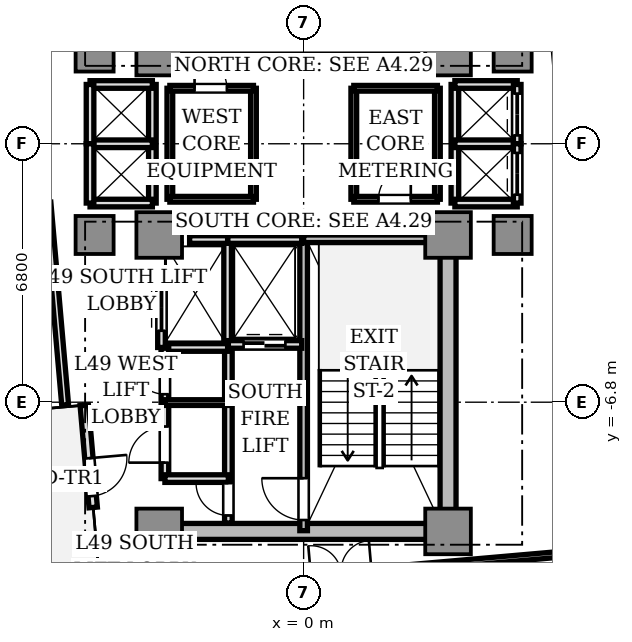
"""IFC4 building model, lengths in metres.
Left out: names, types, materials, properties, quantities, classifications, styles, units other than length and angle.
Written with IfcOpenShell. Run it as: python <this file> out.ifc"""

import sys

from ifc_helpers import new_model, si_unit, direction, frame, frame_2d, origin, origin_2d, place, context, subcontext, project, spatial, rectangle, extrude, source, transform, mapped, element, fill, save


model = new_model("IFC4")
c1 = context("Model", 3, precision=1e-05, world=origin(), true_north=direction((0.0, 1.0)))
c2 = subcontext(c1, "Body", "Model", "MODEL_VIEW")
j1 = project(units=[si_unit("LENGTHUNIT", "METRE"), si_unit("PLANEANGLEUNIT", "RADIAN")], contexts=[c1])
p1 = place(None, origin())
s1 = spatial("IfcSite", under=j1, at=p1, CompositionType="ELEMENT")
p2 = place(p1, origin())
s2 = spatial("IfcBuilding", under=s1, at=p2, CompositionType="ELEMENT")
p3 = place(p2, frame((0.0, 0.0, 178.55)))
s3 = spatial("IfcBuildingStorey", under=s2, at=p3, CompositionType="ELEMENT", Elevation=178.55)
p4 = place(p3, frame((-3.55, -10.2, 0.0), z_axis=(0.0, 0.0, 1.0), x_axis=(1.0, 0.0, 0.0)))
e1 = element("IfcWall", 1, at=p4, inside=s3, PredefinedType="SHEAR", context=c2, shape_type="SweptSolid", body=[
    extrude(rectangle(XDim=7.1, YDim=0.42, at=frame_2d((3.55, 0.0))), origin(), (0.0, 0.0, 1.0), 3.11),
])
p5 = place(p3, frame((3.8, -9.75, 0.0), z_axis=(0.0, 0.0, 1.0), x_axis=(0.0, 1.0, 0.0)))
e2 = element("IfcWall", 2, at=p5, inside=s3, PredefinedType="SHEAR", context=c2, shape_type="SweptSolid", body=[
    extrude(rectangle(XDim=6.9, YDim=0.42, at=frame_2d((3.45, 0.0))), origin(), (0.0, 0.0, 1.0), 3.11),
])
m1 = source(origin(), c2, "Body", "SweptSolid", [
    extrude(rectangle(XDim=1.2, YDim=1.2, at=origin_2d()), origin(), (0.0, 0.0, 1.0), 3.11),
])
for number, where, z_axis, x_axis in (
    (3, (-3.8, 2.4, 0.0), (0.0, 0.0, 1.0), (1.0, 0.0, 0.0)),
    (4, (3.8, 2.4, 0.0), (0.0, 0.0, 1.0), (1.0, 0.0, 0.0)),
    (5, (-3.8, -2.4, 0.0), (0.0, 0.0, 1.0), (1.0, 0.0, 0.0)),
    (6, (3.8, -2.4, 0.0), (0.0, 0.0, 1.0), (1.0, 0.0, 0.0)),
    (7, (-3.8, -10.2, 0.0), (0.0, 0.0, 1.0), (1.0, 0.0, 0.0)),
    (8, (3.8, -10.2, 0.0), (0.0, 0.0, 1.0), (1.0, 0.0, 0.0)),
):
    element("IfcColumn", number, at=place(p3, frame(where, z_axis=z_axis, x_axis=x_axis)), inside=s3, PredefinedType="COLUMN", context=c2, shape_type="MappedRepresentation", body=[
        mapped(m1, transform((0.0, 0.0, 0.0), scale=1.0)),
    ])
m2 = source(origin(), c2, "Body", "SweptSolid", [
    extrude(rectangle(XDim=1.0, YDim=1.0, at=origin_2d()), origin(), (0.0, 0.0, 1.0), 3.11),
])
for number, where, z_axis, x_axis in (
    (9, (5.5, 2.4, 0.0), (0.0, 0.0, 1.0), (1.0, 0.0, 0.0)),
    (10, (-5.5, 2.4, 0.0), (0.0, 0.0, 1.0), (1.0, 0.0, 0.0)),
    (11, (5.5, -2.4, 0.0), (0.0, 0.0, 1.0), (1.0, 0.0, 0.0)),
    (12, (-5.5, -2.4, 0.0), (0.0, 0.0, 1.0), (1.0, 0.0, 0.0)),
):
    element("IfcColumn", number, at=place(p3, frame(where, z_axis=z_axis, x_axis=x_axis)), inside=s3, PredefinedType="COLUMN", context=c2, shape_type="MappedRepresentation", body=[
        mapped(m2, transform((0.0, 0.0, 0.0), scale=1.0)),
    ])
p6 = place(p3, frame((-5.772, -6.879, 0.0), z_axis=(0.0, 0.0, 1.0), x_axis=(0.087168071984, -0.996193619346, 0.0)))
e13 = element("IfcWall", 13, at=p6, inside=s3, PredefinedType="STANDARD", context=c2, shape_type="SweptSolid", body=[
    extrude(rectangle(XDim=2.7, YDim=0.22, at=frame_2d((1.35, 0.0))), origin(), (0.0, 0.0, 1.0), 3.11),
])
p7 = place(p6, frame((1.4, 0.0, 0.0)))
e14 = element("IfcOpeningElement", 14, at=p7, cuts=e13, PredefinedType="OPENING", context=c2, shape_type="SweptSolid", body=[
    extrude(rectangle(XDim=1.0, YDim=2.2, at=frame_2d((0.5, 1.1))), frame((0.0, 0.12, 0.0), z_axis=(0.0, -1.0, 0.0), x_axis=(1.0, 0.0, 0.0)), (0.0, 0.0, 1.0), 0.24),
])
p8 = place(p3, frame((0.0, -10.18, 0.0), z_axis=(0.0, 0.0, 1.0), x_axis=(0.0, 1.0, 0.0)))
e15 = element("IfcWall", 15, at=p8, inside=s3, PredefinedType="SOLIDWALL", context=c2, shape_type="SweptSolid", body=[
    extrude(rectangle(XDim=7.68, YDim=0.2, at=frame_2d((3.84, 0.0))), origin(), (0.0, 0.0, 1.0), 3.11),
])
p9 = place(p8, frame((0.28, 0.0, 0.0)))
e16 = element("IfcOpeningElement", 16, at=p9, cuts=e15, PredefinedType="OPENING", context=c2, shape_type="SweptSolid", body=[
    extrude(rectangle(XDim=1.1, YDim=2.15, at=frame_2d((0.55, 1.075))), frame((0.0, 0.11, 0.0), z_axis=(0.0, -1.0, 0.0), x_axis=(1.0, 0.0, 0.0)), (0.0, 0.0, 1.0), 0.22),
])
p10 = place(p3, frame((0.0, -2.5, 0.0), z_axis=(0.0, 0.0, 1.0), x_axis=(1.0, 0.0, 0.0)))
e17 = element("IfcWall", 17, at=p10, inside=s3, PredefinedType="SOLIDWALL", context=c2, shape_type="SweptSolid", body=[
    extrude(rectangle(XDim=3.72, YDim=0.2, at=frame_2d((1.86, 0.0))), origin(), (0.0, 0.0, 1.0), 3.11),
])
p11 = place(p3, frame((-1.98, -9.98, 0.0), z_axis=(0.0, 0.0, 1.0), x_axis=(0.0, 1.0, 0.0)))
e18 = element("IfcWall", 18, at=p11, inside=s3, PredefinedType="SOLIDWALL", context=c2, shape_type="SweptSolid", body=[
    extrude(rectangle(XDim=4.66, YDim=0.2, at=frame_2d((2.33, 0.0))), origin(), (0.0, 0.0, 1.0), 2.66),
])
p12 = place(p11, frame((0.2, 0.0, 0.0)))
e19 = element("IfcOpeningElement", 19, at=p12, cuts=e18, PredefinedType="OPENING", context=c2, shape_type="SweptSolid", body=[
    extrude(rectangle(XDim=0.85, YDim=2.1, at=frame_2d((0.425, 1.05))), frame((0.0, 0.11, 0.0), z_axis=(0.0, -1.0, 0.0), x_axis=(1.0, 0.0, 0.0)), (0.0, 0.0, 1.0), 0.22),
])
p13 = place(p3, frame((-2.0, -5.28, 0.0), z_axis=(0.0, 0.0, 1.0), x_axis=(0.0, 1.0, 0.0)))
e20 = element("IfcWall", 20, at=p13, inside=s3, PredefinedType="SOLIDWALL", context=c2, shape_type="SweptSolid", body=[
    extrude(rectangle(XDim=2.78, YDim=0.2, at=frame_2d((1.39, 0.0))), origin(), (0.0, 0.0, 1.0), 2.66),
])
p14 = place(p3, frame((-2.0, -2.52, 0.0), z_axis=(0.0, 0.0, 1.0), x_axis=(1.0, 0.0, 0.0)))
e21 = element("IfcWall", 21, at=p14, inside=s3, PredefinedType="SOLIDWALL", context=c2, shape_type="SweptSolid", body=[
    extrude(rectangle(XDim=1.95, YDim=0.2, at=frame_2d((0.975, 0.0))), origin(), (0.0, 0.0, 1.0), 2.66),
])
p15 = place(p3, frame((-1.98, -5.28, 0.0), z_axis=(0.0, 0.0, 1.0), x_axis=(1.0, 0.0, 0.0)))
e22 = element("IfcWall", 22, at=p15, inside=s3, PredefinedType="SOLIDWALL", context=c2, shape_type="SweptSolid", body=[
    extrude(rectangle(XDim=1.93, YDim=0.2, at=frame_2d((0.965, 0.0))), origin(), (0.0, 0.0, 1.0), 2.66),
])
p16 = place(p15, frame((0.4, 0.0, 0.0)))
e23 = element("IfcOpeningElement", 23, at=p16, cuts=e22, PredefinedType="OPENING", context=c2, shape_type="SweptSolid", body=[
    extrude(rectangle(XDim=1.1, YDim=2.2, at=frame_2d((0.55, 1.1))), frame((0.0, 0.11, 0.0), z_axis=(0.0, -1.0, 0.0), x_axis=(1.0, 0.0, 0.0)), (0.0, 0.0, 1.0), 0.22),
])
p17 = place(p3, frame((-3.0, -2.52, 0.0), z_axis=(0.0, 0.0, 1.0), x_axis=(1.0, 0.0, 0.0)))
e24 = element("IfcWall", 24, at=p17, inside=s3, PredefinedType="SOLIDWALL", context=c2, shape_type="SweptSolid", body=[
    extrude(rectangle(XDim=1.0, YDim=0.2, at=frame_2d((0.5, 0.0))), origin(), (0.0, 0.0, 1.0), 2.66),
])
p18 = place(p3, frame((-3.74, -5.36, 0.0), z_axis=(0.0, 0.0, 1.0), x_axis=(1.0, 0.0, 0.0)))
e25 = element("IfcWall", 25, at=p18, inside=s3, PredefinedType="SOLIDWALL", context=c2, shape_type="SweptSolid", body=[
    extrude(rectangle(XDim=1.74, YDim=0.2, at=frame_2d((0.87, 0.0))), origin(), (0.0, 0.0, 1.0), 2.66),
])
p19 = place(p3, frame((-3.74, -5.36, 0.0), z_axis=(0.0, 0.0, 1.0), x_axis=(0.0, 1.0, 0.0)))
e26 = element("IfcWall", 26, at=p19, inside=s3, PredefinedType="SOLIDWALL", context=c2, shape_type="SweptSolid", body=[
    extrude(rectangle(XDim=2.08, YDim=0.2, at=frame_2d((1.04, 0.0))), origin(), (0.0, 0.0, 1.0), 2.66),
])
p20 = place(p19, frame((0.44, 0.0, 0.0)))
e27 = element("IfcOpeningElement", 27, at=p20, cuts=e26, PredefinedType="OPENING", context=c2, shape_type="SweptSolid", body=[
    extrude(rectangle(XDim=1.2, YDim=2.2, at=frame_2d((0.6, 1.1))), frame((0.0, 0.11, 0.0), z_axis=(0.0, -1.0, 0.0), x_axis=(1.0, 0.0, 0.0)), (0.0, 0.0, 1.0), 0.22),
])
p21 = place(p3, frame((3.98, -1.56, 0.0), z_axis=(0.0, 0.0, 1.0), x_axis=(0.0, 1.0, 0.0)))
e28 = element("IfcWall", 28, at=p21, inside=s3, PredefinedType="SOLIDWALL", context=c2, shape_type="SweptSolid", body=[
    extrude(rectangle(XDim=3.12, YDim=0.2, at=frame_2d((1.56, 0.0))), origin(), (0.0, 0.0, 1.0), 2.28),
])
for number, where, z_axis, x_axis in (
    (29, (3.98, 1.56, 0.0), (0.0, 0.0, 1.0), (1.0, 0.0, 0.0)),
    (30, (3.98, -1.56, 0.0), (0.0, 0.0, 1.0), (1.0, 0.0, 0.0)),
    (31, (3.98, 0.0, 0.0), (0.0, 0.0, 1.0), (1.0, 0.0, 0.0)),
):
    element("IfcWall", number, at=place(p3, frame(where, z_axis=z_axis, x_axis=x_axis)), inside=s3, PredefinedType="SOLIDWALL", context=c2, shape_type="SweptSolid", body=[
        extrude(rectangle(XDim=1.64, YDim=0.2, at=frame_2d((0.82, 0.0))), origin(), (0.0, 0.0, 1.0), 2.66),
    ])
p22 = place(p3, frame((5.62, 0.0, 0.0), z_axis=(0.0, 0.0, 1.0), x_axis=(0.0, 1.0, 0.0)))
e32 = element("IfcWall", 32, at=p22, inside=s3, PredefinedType="SOLIDWALL", context=c2, shape_type="SweptSolid", body=[
    extrude(rectangle(XDim=1.56, YDim=0.2, at=frame_2d((0.78, 0.0))), origin(), (0.0, 0.0, 1.0), 2.66),
])
p23 = place(p22, frame((0.22, 0.0, 0.0)))
e33 = element("IfcOpeningElement", 33, at=p23, cuts=e32, PredefinedType="OPENING", context=c2, shape_type="SweptSolid", body=[
    extrude(rectangle(XDim=1.1, YDim=2.2, at=frame_2d((0.55, 1.1))), frame((0.0, 0.11, 0.0), z_axis=(0.0, -1.0, 0.0), x_axis=(1.0, 0.0, 0.0)), (0.0, 0.0, 1.0), 0.22),
])
p24 = place(p3, frame((5.62, -1.56, 0.0), z_axis=(0.0, 0.0, 1.0), x_axis=(0.0, 1.0, 0.0)))
e34 = element("IfcWall", 34, at=p24, inside=s3, PredefinedType="SOLIDWALL", context=c2, shape_type="SweptSolid", body=[
    extrude(rectangle(XDim=1.56, YDim=0.2, at=frame_2d((0.78, 0.0))), origin(), (0.0, 0.0, 1.0), 2.66),
])
p25 = place(p24, frame((0.22, 0.0, 0.0)))
e35 = element("IfcOpeningElement", 35, at=p25, cuts=e34, PredefinedType="OPENING", context=c2, shape_type="SweptSolid", body=[
    extrude(rectangle(XDim=1.1, YDim=2.2, at=frame_2d((0.55, 1.1))), frame((0.0, 0.11, 0.0), z_axis=(0.0, -1.0, 0.0), x_axis=(1.0, 0.0, 0.0)), (0.0, 0.0, 1.0), 0.22),
])
p26 = place(p3, frame((-3.98, -1.56, 0.0), z_axis=(0.0, 0.0, 1.0), x_axis=(0.0, 1.0, 0.0)))
e36 = element("IfcWall", 36, at=p26, inside=s3, PredefinedType="SOLIDWALL", context=c2, shape_type="SweptSolid", body=[
    extrude(rectangle(XDim=3.12, YDim=0.2, at=frame_2d((1.56, 0.0))), origin(), (0.0, 0.0, 1.0), 2.28),
])
for number, where, z_axis, x_axis in (
    (37, (-5.62, 1.56, 0.0), (0.0, 0.0, 1.0), (1.0, 0.0, 0.0)),
    (38, (-5.62, -1.56, 0.0), (0.0, 0.0, 1.0), (1.0, 0.0, 0.0)),
    (39, (-5.62, 0.0, 0.0), (0.0, 0.0, 1.0), (1.0, 0.0, 0.0)),
):
    element("IfcWall", number, at=place(p3, frame(where, z_axis=z_axis, x_axis=x_axis)), inside=s3, PredefinedType="SOLIDWALL", context=c2, shape_type="SweptSolid", body=[
        extrude(rectangle(XDim=1.64, YDim=0.2, at=frame_2d((0.82, 0.0))), origin(), (0.0, 0.0, 1.0), 2.66),
    ])
for number, where, z_axis, x_axis in (
    (40, (-5.62, 0.0, 0.0), (0.0, 0.0, 1.0), (0.0, 1.0, 0.0)),
    (41, (-5.62, -1.56, 0.0), (0.0, 0.0, 1.0), (0.0, 1.0, 0.0)),
):
    element("IfcWall", number, at=place(p3, frame(where, z_axis=z_axis, x_axis=x_axis)), inside=s3, PredefinedType="SOLIDWALL", context=c2, shape_type="SweptSolid", body=[
        extrude(rectangle(XDim=1.56, YDim=0.2, at=frame_2d((0.78, 0.0))), origin(), (0.0, 0.0, 1.0), 2.66),
    ])
p27 = place(p3, frame((-3.65, -8.81, 0.0), z_axis=(0.0, 0.0, 1.0), x_axis=(0.0, 1.0, 0.0)))
e42 = element("IfcWall", 42, at=p27, inside=s3, PredefinedType="SOLIDWALL", context=c2, shape_type="SweptSolid", body=[
    extrude(rectangle(XDim=3.43, YDim=0.2, at=frame_2d((1.715, 0.0))), origin(), (0.0, 0.0, 1.0), 2.66),
])
p28 = place(p27, frame((0.42, 0.0, 0.0)))
e43 = element("IfcOpeningElement", 43, at=p28, cuts=e42, PredefinedType="OPENING", context=c2, shape_type="SweptSolid", body=[
    extrude(rectangle(XDim=0.95, YDim=2.15, at=frame_2d((0.475, 1.075))), frame((0.0, 0.11, 0.0), z_axis=(0.0, -1.0, 0.0), x_axis=(1.0, 0.0, 0.0)), (0.0, 0.0, 1.0), 0.22),
])
p29 = place(p27, frame((2.22, 0.0, 0.0)))
e44 = element("IfcOpeningElement", 44, at=p29, cuts=e42, PredefinedType="OPENING", context=c2, shape_type="SweptSolid", body=[
    extrude(rectangle(XDim=0.85, YDim=2.1, at=frame_2d((0.425, 1.05))), frame((0.0, 0.11, 0.0), z_axis=(0.0, -1.0, 0.0), x_axis=(1.0, 0.0, 0.0)), (0.0, 0.0, 1.0), 0.22),
])
p30 = place(p3, frame((-3.65, -8.81, 0.0), z_axis=(0.0, 0.0, 1.0), x_axis=(1.0, 0.0, 0.0)))
e45 = element("IfcWall", 45, at=p30, inside=s3, PredefinedType="SOLIDWALL", context=c2, shape_type="SweptSolid", body=[
    extrude(rectangle(XDim=1.67, YDim=0.2, at=frame_2d((0.835, 0.0))), origin(), (0.0, 0.0, 1.0), 2.66),
])
p31 = place(p3, frame((-3.65, -6.81, 0.0), z_axis=(0.0, 0.0, 1.0), x_axis=(1.0, 0.0, 0.0)))
e46 = element("IfcWall", 46, at=p31, inside=s3, PredefinedType="PARTITIONING", context=c2, shape_type="SweptSolid", body=[
    extrude(rectangle(XDim=1.67, YDim=0.15, at=frame_2d((0.835, 0.0))), origin(), (0.0, 0.0, 1.0), 2.66),
])
p32 = place(p3, frame((-1.32, -1.46, 0.0), z_axis=(0.0, 0.0, 1.0), x_axis=(0.0, 1.0, 0.0)))
e47 = element("IfcWall", 47, at=p32, inside=s3, PredefinedType="PARTITIONING", context=c2, shape_type="SweptSolid", body=[
    extrude(rectangle(XDim=2.92, YDim=0.15, at=frame_2d((1.46, 0.0))), origin(), (0.0, 0.0, 1.0), 2.66),
])
p33 = place(p3, frame((-3.52, -1.46, 0.0), z_axis=(0.0, 0.0, 1.0), x_axis=(0.0, 1.0, 0.0)))
e48 = element("IfcWall", 48, at=p33, inside=s3, PredefinedType="PARTITIONING", context=c2, shape_type="SweptSolid", body=[
    extrude(rectangle(XDim=2.92, YDim=0.15, at=frame_2d((1.46, 0.0))), origin(), (0.0, 0.0, 1.0), 2.28),
])
p34 = place(p3, frame((-3.52, 1.46, 0.0), z_axis=(0.0, 0.0, 1.0), x_axis=(1.0, 0.0, 0.0)))
e49 = element("IfcWall", 49, at=p34, inside=s3, PredefinedType="PARTITIONING", context=c2, shape_type="SweptSolid", body=[
    extrude(rectangle(XDim=2.2, YDim=0.15, at=frame_2d((1.1, 0.0))), origin(), (0.0, 0.0, 1.0), 2.66),
])
p35 = place(p34, frame((0.65, 0.0, 0.0)))
e50 = element("IfcOpeningElement", 50, at=p35, cuts=e49, PredefinedType="OPENING", context=c2, shape_type="SweptSolid", body=[
    extrude(rectangle(XDim=0.85, YDim=2.1, at=frame_2d((0.425, 1.05))), frame((0.0, 0.085, 0.0), z_axis=(0.0, -1.0, 0.0), x_axis=(1.0, 0.0, 0.0)), (0.0, 0.0, 1.0), 0.17),
])
p36 = place(p3, frame((-3.52, -1.46, 0.0), z_axis=(0.0, 0.0, 1.0), x_axis=(1.0, 0.0, 0.0)))
e51 = element("IfcWall", 51, at=p36, inside=s3, PredefinedType="PARTITIONING", context=c2, shape_type="SweptSolid", body=[
    extrude(rectangle(XDim=2.2, YDim=0.15, at=frame_2d((1.1, 0.0))), origin(), (0.0, 0.0, 1.0), 2.66),
])
p37 = place(p3, frame((1.32, -1.46, 0.0), z_axis=(0.0, 0.0, 1.0), x_axis=(0.0, 1.0, 0.0)))
e52 = element("IfcWall", 52, at=p37, inside=s3, PredefinedType="PARTITIONING", context=c2, shape_type="SweptSolid", body=[
    extrude(rectangle(XDim=2.92, YDim=0.15, at=frame_2d((1.46, 0.0))), origin(), (0.0, 0.0, 1.0), 2.66),
])
p38 = place(p3, frame((3.52, -1.46, 0.0), z_axis=(0.0, 0.0, 1.0), x_axis=(0.0, 1.0, 0.0)))
e53 = element("IfcWall", 53, at=p38, inside=s3, PredefinedType="PARTITIONING", context=c2, shape_type="SweptSolid", body=[
    extrude(rectangle(XDim=2.92, YDim=0.15, at=frame_2d((1.46, 0.0))), origin(), (0.0, 0.0, 1.0), 2.28),
])
p39 = place(p3, frame((1.32, 1.46, 0.0), z_axis=(0.0, 0.0, 1.0), x_axis=(1.0, 0.0, 0.0)))
e54 = element("IfcWall", 54, at=p39, inside=s3, PredefinedType="PARTITIONING", context=c2, shape_type="SweptSolid", body=[
    extrude(rectangle(XDim=2.2, YDim=0.15, at=frame_2d((1.1, 0.0))), origin(), (0.0, 0.0, 1.0), 2.66),
])
p40 = place(p3, frame((1.32, -1.46, 0.0), z_axis=(0.0, 0.0, 1.0), x_axis=(1.0, 0.0, 0.0)))
e55 = element("IfcWall", 55, at=p40, inside=s3, PredefinedType="PARTITIONING", context=c2, shape_type="SweptSolid", body=[
    extrude(rectangle(XDim=2.2, YDim=0.15, at=frame_2d((1.1, 0.0))), origin(), (0.0, 0.0, 1.0), 2.66),
])
p41 = place(p40, frame((0.65, 0.0, 0.0)))
e56 = element("IfcOpeningElement", 56, at=p41, cuts=e55, PredefinedType="OPENING", context=c2, shape_type="SweptSolid", body=[
    extrude(rectangle(XDim=0.85, YDim=2.1, at=frame_2d((0.425, 1.05))), frame((0.0, 0.085, 0.0), z_axis=(0.0, -1.0, 0.0), x_axis=(1.0, 0.0, 0.0)), (0.0, 0.0, 1.0), 0.17),
])
p42 = place(p3, frame((7.373, -5.679, 0.0), z_axis=(0.0, 0.0, 1.0), x_axis=(-0.087163455754, 0.996194023261, 0.0)))
e57 = element("IfcWall", 57, at=p42, inside=s3, PredefinedType="PARTITIONING", context=c2, shape_type="SweptSolid", body=[
    extrude(rectangle(XDim=10.4, YDim=0.18, at=frame_2d((5.2, 0.0))), origin(), (0.0, 0.0, 1.0), 2.66),
])
p43 = place(p3, frame((-6.741, -1.543, 0.0), z_axis=(0.0, 0.0, 1.0), x_axis=(0.087161289348, -0.996194212812, 0.0)))
e58 = element("IfcWall", 58, at=p43, inside=s3, PredefinedType="PARTITIONING", context=c2, shape_type="SweptSolid", body=[
    extrude(rectangle(XDim=5.35, YDim=0.18, at=frame_2d((2.675, 0.0))), origin(), (0.0, 0.0, 1.0), 2.66),
])
p44 = place(p3, frame((-5.287, -11.856, 0.0), z_axis=(0.0, 0.0, 1.0), x_axis=(0.996194790044, 0.087154691724, 0.0)))
e59 = element("IfcWall", 59, at=p44, inside=s3, PredefinedType="PARTITIONING", context=c2, shape_type="SweptSolid", body=[
    extrude(rectangle(XDim=12.6, YDim=0.15, at=frame_2d((6.3, 0.0))), origin(), (0.0, 0.0, 1.0), 2.66),
])
p45 = place(p44, frame((5.5, 0.0, 0.0)))
e60 = element("IfcOpeningElement", 60, at=p45, cuts=e59, PredefinedType="OPENING", context=c2, shape_type="SweptSolid", body=[
    extrude(rectangle(XDim=1.6, YDim=2.25, at=frame_2d((0.8, 1.125))), frame((0.0, 0.085, 0.0), z_axis=(0.0, -1.0, 0.0), x_axis=(1.0, 0.0, 0.0)), (0.0, 0.0, 1.0), 0.17),
])
m3 = source(origin(), c2, "Body", "SweptSolid", [
    extrude(rectangle(XDim=1.0, YDim=0.05, at=origin_2d()), origin(), (0.0, 0.0, 1.0), 2.2),
])
p46 = place(p7, frame((0.5, 0.0, 0.0)))
e61 = element("IfcDoor", 61, at=p46, inside=s3, OperationType="SINGLE_SWING_LEFT", PredefinedType="DOOR", context=c2, shape_type="MappedRepresentation", body=[
    mapped(m3, transform((0.0, 0.0, 0.0), scale=1.0)),
])
fill(e14, e61)
m4 = source(origin(), c2, "Body", "SweptSolid", [
    extrude(rectangle(XDim=1.1, YDim=0.05, at=origin_2d()), origin(), (0.0, 0.0, 1.0), 2.15),
])
p47 = place(p9, frame((0.55, 0.0, 0.0)))
e62 = element("IfcDoor", 62, at=p47, inside=s3, OperationType="SINGLE_SWING_RIGHT", PredefinedType="DOOR", context=c2, shape_type="MappedRepresentation", body=[
    mapped(m4, transform((0.0, 0.0, 0.0), scale=1.0)),
])
fill(e16, e62)
m5 = source(origin(), c2, "Body", "SweptSolid", [
    extrude(rectangle(XDim=0.85, YDim=0.05, at=origin_2d()), origin(), (0.0, 0.0, 1.0), 2.1),
])
p48 = place(p12, frame((0.425, 0.0, 0.0)))
e63 = element("IfcDoor", 63, at=p48, inside=s3, OperationType="SINGLE_SWING_RIGHT", PredefinedType="DOOR", context=c2, shape_type="MappedRepresentation", body=[
    mapped(m5, transform((0.0, 0.0, 0.0), scale=1.0)),
])
fill(e19, e63)
m6 = source(origin(), c2, "Body", "SweptSolid", [
    extrude(rectangle(XDim=1.1, YDim=0.05, at=origin_2d()), origin(), (0.0, 0.0, 1.0), 2.2),
])
p49 = place(p16, frame((0.55, 0.0, 0.0)))
e64 = element("IfcDoor", 64, at=p49, inside=s3, OperationType="DOUBLE_DOOR_SLIDING", PredefinedType="DOOR", context=c2, shape_type="MappedRepresentation", body=[
    mapped(m6, transform((0.0, 0.0, 0.0), scale=1.0)),
])
fill(e23, e64)
m7 = source(origin(), c2, "Body", "SweptSolid", [
    extrude(rectangle(XDim=1.2, YDim=0.05, at=origin_2d()), origin(), (0.0, 0.0, 1.0), 2.2),
])
p50 = place(p20, frame((0.6, 0.0, 0.0)))
e65 = element("IfcDoor", 65, at=p50, inside=s3, OperationType="DOUBLE_DOOR_SLIDING", PredefinedType="DOOR", context=c2, shape_type="MappedRepresentation", body=[
    mapped(m7, transform((0.0, 0.0, 0.0), scale=1.0)),
])
fill(e27, e65)
p51 = place(p23, frame((0.55, 0.0, 0.0)))
e66 = element("IfcDoor", 66, at=p51, inside=s3, OperationType="DOUBLE_DOOR_SLIDING", PredefinedType="DOOR", context=c2, shape_type="MappedRepresentation", body=[
    mapped(m6, transform((0.0, 0.0, 0.0), scale=1.0)),
])
fill(e33, e66)
p52 = place(p25, frame((0.55, 0.0, 0.0)))
e67 = element("IfcDoor", 67, at=p52, inside=s3, OperationType="DOUBLE_DOOR_SLIDING", PredefinedType="DOOR", context=c2, shape_type="MappedRepresentation", body=[
    mapped(m6, transform((0.0, 0.0, 0.0), scale=1.0)),
])
fill(e35, e67)
m8 = source(origin(), c2, "Body", "SweptSolid", [
    extrude(rectangle(XDim=0.95, YDim=0.05, at=origin_2d()), origin(), (0.0, 0.0, 1.0), 2.15),
])
p53 = place(p28, frame((0.475, 0.0, 0.0)))
e68 = element("IfcDoor", 68, at=p53, inside=s3, OperationType="SINGLE_SWING_LEFT", PredefinedType="DOOR", context=c2, shape_type="MappedRepresentation", body=[
    mapped(m8, transform((0.0, 0.0, 0.0), scale=1.0)),
])
fill(e43, e68)
p54 = place(p29, frame((0.425, 0.0, 0.0)))
e69 = element("IfcDoor", 69, at=p54, inside=s3, OperationType="SINGLE_SWING_RIGHT", PredefinedType="DOOR", context=c2, shape_type="MappedRepresentation", body=[
    mapped(m5, transform((0.0, 0.0, 0.0), scale=1.0)),
])
fill(e44, e69)
p55 = place(p35, frame((0.425, 0.0, 0.0)))
e70 = element("IfcDoor", 70, at=p55, inside=s3, OperationType="SINGLE_SWING_LEFT", PredefinedType="DOOR", context=c2, shape_type="MappedRepresentation", body=[
    mapped(m5, transform((0.0, 0.0, 0.0), scale=1.0)),
])
fill(e50, e70)
p56 = place(p41, frame((0.425, 0.0, 0.0)))
e71 = element("IfcDoor", 71, at=p56, inside=s3, OperationType="SINGLE_SWING_RIGHT", PredefinedType="DOOR", context=c2, shape_type="MappedRepresentation", body=[
    mapped(m5, transform((0.0, 0.0, 0.0), scale=1.0)),
])
fill(e56, e71)
save(model, sys.argv[1])
